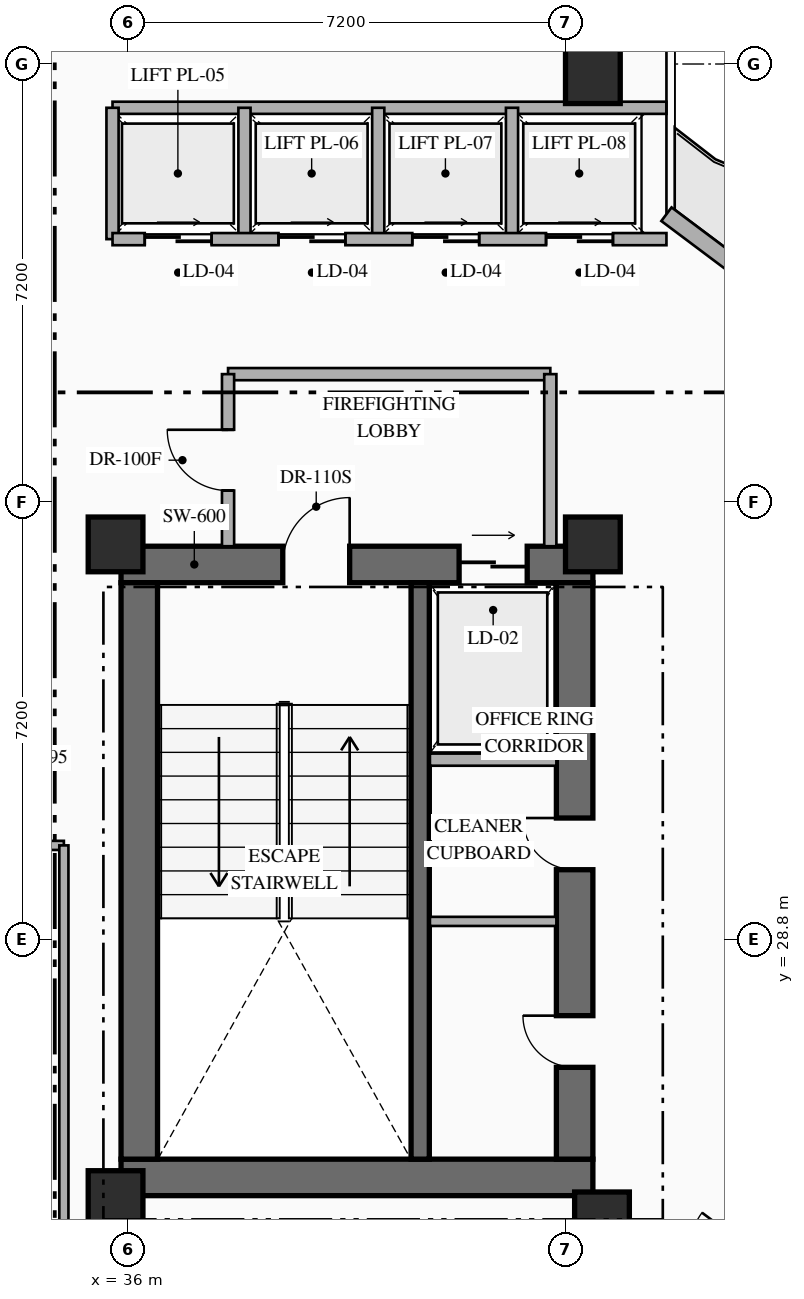
"""IFC4 building model, lengths in metres.
Left out: names, types, materials, properties, quantities, classifications, styles, units other than length and angle.
Written with IfcOpenShell. Run it as: python <this file> out.ifc"""

import sys

from ifc_helpers import new_model, si_unit, direction, frame, frame_2d, origin, origin_2d, place, context, subcontext, project, spatial, rectangle, extrude, element, fill, save


model = new_model("IFC4")
c1 = context("Model", 3, precision=1e-05, world=origin(), true_north=direction((0.0, 1.0)))
c2 = subcontext(c1, "Body", "Model", "MODEL_VIEW")
j1 = project(units=[si_unit("LENGTHUNIT", "METRE"), si_unit("PLANEANGLEUNIT", "RADIAN")], contexts=[c1])
p1 = place(None, origin())
s1 = spatial("IfcSite", under=j1, at=p1, CompositionType="ELEMENT")
p2 = place(p1, origin())
s2 = spatial("IfcBuilding", under=s1, at=p2, CompositionType="ELEMENT")
p3 = place(p2, frame((0.0, 0.0, 119.25)))
s3 = spatial("IfcBuildingStorey", under=s2, at=p3, CompositionType="ELEMENT", Elevation=119.25)
p4 = place(p3, frame((35.89, 24.89, 0.0), z_axis=(0.0, 0.0, 1.0), x_axis=(1.0, 0.0, 0.0)))
e1 = element("IfcWall", 1, at=p4, inside=s3, PredefinedType="SHEAR", context=c2, shape_type="SweptSolid", body=[
    extrude(rectangle(XDim=7.76, YDim=0.6, at=frame_2d((3.88, 0.0))), origin(), (0.0, 0.0, 1.0), 3.6),
])
p5 = place(p3, frame((35.89, 34.97, 0.0), z_axis=(0.0, 0.0, 1.0), x_axis=(1.0, 0.0, 0.0)))
e2 = element("IfcWall", 2, at=p5, inside=s3, PredefinedType="SHEAR", context=c2, shape_type="SweptSolid", body=[
    extrude(rectangle(XDim=7.76, YDim=0.6, at=frame_2d((3.88, 0.0))), origin(), (0.0, 0.0, 1.0), 3.6),
])
p6 = place(p5, frame((2.66, 0.0, 0.0)))
e3 = element("IfcOpeningElement", 3, at=p6, cuts=e2, PredefinedType="OPENING", context=c2, shape_type="SweptSolid", body=[
    extrude(rectangle(XDim=1.1, YDim=2.2, at=frame_2d((0.55, 1.1))), frame((0.0, 0.31, 0.0), z_axis=(0.0, -1.0, 0.0), x_axis=(1.0, 0.0, 0.0)), (0.0, 0.0, 1.0), 0.62),
])
p7 = place(p5, frame((5.56, 0.0, 0.0)))
e4 = element("IfcOpeningElement", 4, at=p7, cuts=e2, PredefinedType="OPENING", context=c2, shape_type="SweptSolid", body=[
    extrude(rectangle(XDim=1.12, YDim=2.15, at=frame_2d((0.56, 1.075))), frame((0.0, 0.31, 0.0), z_axis=(0.0, -1.0, 0.0), x_axis=(1.0, 0.0, 0.0)), (0.0, 0.0, 1.0), 0.62),
])
p8 = place(p3, frame((36.19, 25.19, 0.0), z_axis=(0.0, 0.0, 1.0), x_axis=(0.0, 1.0, 0.0)))
e5 = element("IfcWall", 5, at=p8, inside=s3, PredefinedType="SHEAR", context=c2, shape_type="SweptSolid", body=[
    extrude(rectangle(XDim=9.48, YDim=0.6, at=frame_2d((4.74, 0.0))), origin(), (0.0, 0.0, 1.0), 3.6),
])
p9 = place(p3, frame((43.35, 25.19, 0.0), z_axis=(0.0, 0.0, 1.0), x_axis=(0.0, 1.0, 0.0)))
e6 = element("IfcWall", 6, at=p9, inside=s3, PredefinedType="SHEAR", context=c2, shape_type="SweptSolid", body=[
    extrude(rectangle(XDim=9.48, YDim=0.6, at=frame_2d((4.74, 0.0))), origin(), (0.0, 0.0, 1.0), 3.6),
])
p10 = place(p9, frame((1.51, 0.0, 0.0)))
e7 = element("IfcOpeningElement", 7, at=p10, cuts=e6, PredefinedType="OPENING", context=c2, shape_type="SweptSolid", body=[
    extrude(rectangle(XDim=0.85, YDim=2.08, at=frame_2d((0.425, 1.04))), frame((0.0, 0.31, 0.0), z_axis=(0.0, -1.0, 0.0), x_axis=(1.0, 0.0, 0.0)), (0.0, 0.0, 1.0), 0.62),
])
p11 = place(p9, frame((4.76, 0.0, 0.0)))
e8 = element("IfcOpeningElement", 8, at=p11, cuts=e6, PredefinedType="OPENING", context=c2, shape_type="SweptSolid", body=[
    extrude(rectangle(XDim=0.85, YDim=2.08, at=frame_2d((0.425, 1.04))), frame((0.0, 0.31, 0.0), z_axis=(0.0, -1.0, 0.0), x_axis=(1.0, 0.0, 0.0)), (0.0, 0.0, 1.0), 0.62),
])
p12 = place(p3, frame((40.81, 25.19, 0.0), z_axis=(0.0, 0.0, 1.0), x_axis=(0.0, 1.0, 0.0)))
e9 = element("IfcWall", 9, at=p12, inside=s3, PredefinedType="SHEAR", context=c2, shape_type="SweptSolid", body=[
    extrude(rectangle(XDim=9.48, YDim=0.3, at=frame_2d((4.74, 0.0))), origin(), (0.0, 0.0, 1.0), 3.6),
])
for number, where, z_axis, x_axis in (
    (10, (35.8, 24.55, 0.0), (0.0, 0.0, 1.0), (1.0, 0.0, 0.0)),
    (11, (43.8, 24.2, 0.0), (0.0, 0.0, 1.0), (1.0, 0.0, 0.0)),
    (12, (35.8, 35.3, 0.0), (0.0, 0.0, 1.0), (1.0, 0.0, 0.0)),
    (13, (43.65, 35.3, 0.0), (0.0, 0.0, 1.0), (1.0, 0.0, 0.0)),
    (14, (43.65, 43.0, 0.0), (0.0, 0.0, 1.0), (1.0, 0.0, 0.0)),
):
    element("IfcColumn", number, at=place(p3, frame(where, z_axis=z_axis, x_axis=x_axis)), inside=s3, PredefinedType="COLUMN", context=c2, shape_type="SweptSolid", body=[
        extrude(rectangle(XDim=0.9, YDim=0.9, at=origin_2d()), origin(), (0.0, 0.0, 1.0), 3.6),
    ])
p13 = place(p3, frame((44.86, 40.73, 0.0), z_axis=(0.0, 0.0, 1.0), x_axis=(0.800006902154, -0.599990797017, 0.0)))
e15 = element("IfcWall", 15, at=p13, inside=s3, PredefinedType="STANDARD", context=c2, shape_type="SweptSolid", body=[
    extrude(rectangle(XDim=29.712, YDim=0.28, at=frame_2d((14.856, 0.0))), origin(), (0.0, 0.0, 1.0), 3.35),
])
p14 = place(p13, frame((14.249, 0.0, 0.0)))
e16 = element("IfcOpeningElement", 16, at=p14, cuts=e15, PredefinedType="OPENING", context=c2, shape_type="SweptSolid", body=[
    extrude(rectangle(XDim=1.1, YDim=2.2, at=frame_2d((0.55, 1.1))), frame((0.0, 0.15, 0.0), z_axis=(0.0, -1.0, 0.0), x_axis=(1.0, 0.0, 0.0)), (0.0, 0.0, 1.0), 0.3),
])
p15 = place(p13, frame((6.528, 0.0, 0.85)))
e17 = element("IfcOpeningElement", 17, at=p15, cuts=e15, PredefinedType="OPENING", context=c2, shape_type="SweptSolid", body=[
    extrude(rectangle(XDim=1.8, YDim=2.1, at=frame_2d((0.9, 1.05))), frame((0.0, 0.15, 0.0), z_axis=(0.0, -1.0, 0.0), x_axis=(1.0, 0.0, 0.0)), (0.0, 0.0, 1.0), 0.3),
])
p16 = place(p13, frame((21.384, 0.0, 0.85)))
e18 = element("IfcOpeningElement", 18, at=p16, cuts=e15, PredefinedType="OPENING", context=c2, shape_type="SweptSolid", body=[
    extrude(rectangle(XDim=1.8, YDim=2.1, at=frame_2d((0.9, 1.05))), frame((0.0, 0.15, 0.0), z_axis=(0.0, -1.0, 0.0), x_axis=(1.0, 0.0, 0.0)), (0.0, 0.0, 1.0), 0.3),
])
p17 = place(p3, frame((40.97, 31.76, 0.0), z_axis=(0.0, 0.0, 1.0), x_axis=(1.0, 0.0, 0.0)))
e19 = element("IfcWall", 19, at=p17, inside=s3, PredefinedType="STANDARD", context=c2, shape_type="SweptSolid", body=[
    extrude(rectangle(XDim=2.08, YDim=0.2, at=frame_2d((1.04, 0.0))), origin(), (0.0, 0.0, 1.0), 3.35),
])
p18 = place(p3, frame((40.97, 29.1, 0.0), z_axis=(0.0, 0.0, 1.0), x_axis=(1.0, 0.0, 0.0)))
e20 = element("IfcWall", 20, at=p18, inside=s3, PredefinedType="PARTITIONING", context=c2, shape_type="SweptSolid", body=[
    extrude(rectangle(XDim=2.08, YDim=0.15, at=frame_2d((1.04, 0.0))), origin(), (0.0, 0.0, 1.0), 3.35),
])
p19 = place(p3, frame((37.65, 38.1, 0.0), z_axis=(0.0, 0.0, 1.0), x_axis=(1.0, 0.0, 0.0)))
e21 = element("IfcWall", 21, at=p19, inside=s3, PredefinedType="STANDARD", context=c2, shape_type="SweptSolid", body=[
    extrude(rectangle(XDim=5.3, YDim=0.2, at=frame_2d((2.65, 0.0))), origin(), (0.0, 0.0, 1.0), 3.35),
])
p20 = place(p3, frame((42.95, 35.27, 0.0), z_axis=(0.0, 0.0, 1.0), x_axis=(0.0, 1.0, 0.0)))
e22 = element("IfcWall", 22, at=p20, inside=s3, PredefinedType="STANDARD", context=c2, shape_type="SweptSolid", body=[
    extrude(rectangle(XDim=2.83, YDim=0.2, at=frame_2d((1.415, 0.0))), origin(), (0.0, 0.0, 1.0), 3.35),
])
p21 = place(p3, frame((37.65, 35.27, 0.0), z_axis=(0.0, 0.0, 1.0), x_axis=(0.0, 1.0, 0.0)))
e23 = element("IfcWall", 23, at=p21, inside=s3, PredefinedType="STANDARD", context=c2, shape_type="SweptSolid", body=[
    extrude(rectangle(XDim=2.83, YDim=0.2, at=frame_2d((1.415, 0.0))), origin(), (0.0, 0.0, 1.0), 3.35),
])
p22 = place(p21, frame((0.915, 0.0, 0.0)))
e24 = element("IfcOpeningElement", 24, at=p22, cuts=e23, PredefinedType="OPENING", context=c2, shape_type="SweptSolid", body=[
    extrude(rectangle(XDim=1.0, YDim=2.2, at=frame_2d((0.5, 1.1))), frame((0.0, 0.11, 0.0), z_axis=(0.0, -1.0, 0.0), x_axis=(1.0, 0.0, 0.0)), (0.0, 0.0, 1.0), 0.22),
])
p23 = place(p3, frame((35.75, 42.48, 0.0), z_axis=(0.0, 0.0, 1.0), x_axis=(1.0, 0.0, 0.0)))
e25 = element("IfcWall", 25, at=p23, inside=s3, PredefinedType="STANDARD", context=c2, shape_type="SweptSolid", body=[
    extrude(rectangle(XDim=9.11, YDim=0.2, at=frame_2d((4.555, 0.0))), origin(), (0.0, 0.0, 1.0), 3.35),
])
for number, where, z_axis, x_axis in (
    (26, (35.75, 40.32, 0.0), (0.0, 0.0, 1.0), (0.0, 1.0, 0.0)),
    (27, (37.92, 40.32, 0.0), (0.0, 0.0, 1.0), (0.0, 1.0, 0.0)),
    (28, (40.12, 40.32, 0.0), (0.0, 0.0, 1.0), (0.0, 1.0, 0.0)),
    (29, (42.32, 40.32, 0.0), (0.0, 0.0, 1.0), (0.0, 1.0, 0.0)),
):
    element("IfcWall", number, at=place(p3, frame(where, z_axis=z_axis, x_axis=x_axis)), inside=s3, PredefinedType="STANDARD", context=c2, shape_type="SweptSolid", body=[
        extrude(rectangle(XDim=2.16, YDim=0.2, at=frame_2d((1.08, 0.0))), origin(), (0.0, 0.0, 1.0), 3.35),
    ])
p24 = place(p3, frame((35.75, 40.32, 0.0), z_axis=(0.0, 0.0, 1.0), x_axis=(1.0, 0.0, 0.0)))
e30 = element("IfcWall", 30, at=p24, inside=s3, PredefinedType="STANDARD", context=c2, shape_type="SweptSolid", body=[
    extrude(rectangle(XDim=9.11, YDim=0.2, at=frame_2d((4.555, 0.0))), origin(), (0.0, 0.0, 1.0), 3.35),
])
p25 = place(p24, frame((0.53, 0.0, 0.0)))
e31 = element("IfcOpeningElement", 31, at=p25, cuts=e30, PredefinedType="OPENING", context=c2, shape_type="SweptSolid", body=[
    extrude(rectangle(XDim=1.1, YDim=2.18, at=frame_2d((0.55, 1.09))), frame((0.0, 0.11, 0.0), z_axis=(0.0, -1.0, 0.0), x_axis=(1.0, 0.0, 0.0)), (0.0, 0.0, 1.0), 0.22),
])
p26 = place(p24, frame((2.73, 0.0, 0.0)))
e32 = element("IfcOpeningElement", 32, at=p26, cuts=e30, PredefinedType="OPENING", context=c2, shape_type="SweptSolid", body=[
    extrude(rectangle(XDim=1.1, YDim=2.18, at=frame_2d((0.55, 1.09))), frame((0.0, 0.11, 0.0), z_axis=(0.0, -1.0, 0.0), x_axis=(1.0, 0.0, 0.0)), (0.0, 0.0, 1.0), 0.22),
])
p27 = place(p24, frame((4.93, 0.0, 0.0)))
e33 = element("IfcOpeningElement", 33, at=p27, cuts=e30, PredefinedType="OPENING", context=c2, shape_type="SweptSolid", body=[
    extrude(rectangle(XDim=1.1, YDim=2.18, at=frame_2d((0.55, 1.09))), frame((0.0, 0.11, 0.0), z_axis=(0.0, -1.0, 0.0), x_axis=(1.0, 0.0, 0.0)), (0.0, 0.0, 1.0), 0.22),
])
p28 = place(p24, frame((7.13, 0.0, 0.0)))
e34 = element("IfcOpeningElement", 34, at=p28, cuts=e30, PredefinedType="OPENING", context=c2, shape_type="SweptSolid", body=[
    extrude(rectangle(XDim=1.1, YDim=2.18, at=frame_2d((0.55, 1.09))), frame((0.0, 0.11, 0.0), z_axis=(0.0, -1.0, 0.0), x_axis=(1.0, 0.0, 0.0)), (0.0, 0.0, 1.0), 0.22),
])
p29 = place(p3, frame((30.5, 30.35, 0.0), z_axis=(0.0, 0.0, 1.0), x_axis=(1.0, 0.0, 0.0)))
e35 = element("IfcWall", 35, at=p29, inside=s3, PredefinedType="PARTITIONING", context=c2, shape_type="SweptSolid", body=[
    extrude(rectangle(XDim=4.45, YDim=0.15, at=frame_2d((2.225, 0.0))), origin(), (0.0, 0.0, 1.0), 3.35),
])
p30 = place(p29, frame((2.846, 0.0, 0.0)))
e36 = element("IfcOpeningElement", 36, at=p30, cuts=e35, PredefinedType="OPENING", context=c2, shape_type="SweptSolid", body=[
    extrude(rectangle(XDim=0.95, YDim=2.15, at=frame_2d((0.475, 1.075))), frame((0.0, 0.085, 0.0), z_axis=(0.0, -1.0, 0.0), x_axis=(1.0, 0.0, 0.0)), (0.0, 0.0, 1.0), 0.17),
])
p31 = place(p3, frame((34.95, 23.2, 0.0), z_axis=(0.0, 0.0, 1.0), x_axis=(0.0, 1.0, 0.0)))
e37 = element("IfcWall", 37, at=p31, inside=s3, PredefinedType="PARTITIONING", context=c2, shape_type="SweptSolid", body=[
    extrude(rectangle(XDim=7.15, YDim=0.15, at=frame_2d((3.575, 0.0))), origin(), (0.0, 0.0, 1.0), 3.35),
])
p32 = place(p3, frame((43.04, 19.52, 0.0), z_axis=(0.0, 0.0, 1.0), x_axis=(0.600004069023, 0.799996948216, 0.0)))
e38 = element("IfcWall", 38, at=p32, inside=s3, PredefinedType="PARTITIONING", context=c2, shape_type="SweptSolid", body=[
    extrude(rectangle(XDim=9.6, YDim=0.15, at=frame_2d((4.8, 0.0))), origin(), (0.0, 0.0, 1.0), 3.35),
])
p33 = place(p32, frame((4.325, 0.0, 0.0)))
e39 = element("IfcOpeningElement", 39, at=p33, cuts=e38, PredefinedType="OPENING", context=c2, shape_type="SweptSolid", body=[
    extrude(rectangle(XDim=0.95, YDim=2.15, at=frame_2d((0.475, 1.075))), frame((0.0, 0.085, 0.0), z_axis=(0.0, -1.0, 0.0), x_axis=(1.0, 0.0, 0.0)), (0.0, 0.0, 1.0), 0.17),
])
p34 = place(p6, origin())
e40 = element("IfcDoor", 40, at=p34, inside=s3, OperationType="SINGLE_SWING_RIGHT", PredefinedType="DOOR", context=c2, shape_type="SweptSolid", body=[
    extrude(rectangle(XDim=1.1, YDim=2.2, at=frame_2d((0.55, 1.1))), frame((0.0, 0.025, 0.0), z_axis=(0.0, -1.0, 0.0), x_axis=(1.0, 0.0, 0.0)), (0.0, 0.0, 1.0), 0.05),
])
fill(e3, e40)
p35 = place(p7, origin())
e41 = element("IfcDoor", 41, at=p35, inside=s3, OperationType="SLIDING_TO_RIGHT", PredefinedType="USERDEFINED", context=c2, shape_type="SweptSolid", body=[
    extrude(rectangle(XDim=1.12, YDim=2.15, at=frame_2d((0.56, 1.075))), frame((0.0, 0.025, 0.0), z_axis=(0.0, -1.0, 0.0), x_axis=(1.0, 0.0, 0.0)), (0.0, 0.0, 1.0), 0.05),
])
fill(e4, e41)
p36 = place(p10, origin())
e42 = element("IfcDoor", 42, at=p36, inside=s3, OperationType="SINGLE_SWING_RIGHT", PredefinedType="DOOR", context=c2, shape_type="SweptSolid", body=[
    extrude(rectangle(XDim=0.85, YDim=2.08, at=frame_2d((0.425, 1.04))), frame((0.0, 0.025, 0.0), z_axis=(0.0, -1.0, 0.0), x_axis=(1.0, 0.0, 0.0)), (0.0, 0.0, 1.0), 0.05),
])
fill(e7, e42)
p37 = place(p11, origin())
e43 = element("IfcDoor", 43, at=p37, inside=s3, OperationType="SINGLE_SWING_RIGHT", PredefinedType="DOOR", context=c2, shape_type="SweptSolid", body=[
    extrude(rectangle(XDim=0.85, YDim=2.08, at=frame_2d((0.425, 1.04))), frame((0.0, 0.025, 0.0), z_axis=(0.0, -1.0, 0.0), x_axis=(1.0, 0.0, 0.0)), (0.0, 0.0, 1.0), 0.05),
])
fill(e8, e43)
p38 = place(p22, origin())
e44 = element("IfcDoor", 44, at=p38, inside=s3, OperationType="SINGLE_SWING_RIGHT", PredefinedType="DOOR", context=c2, shape_type="SweptSolid", body=[
    extrude(rectangle(XDim=1.0, YDim=2.2, at=frame_2d((0.5, 1.1))), frame((0.0, 0.025, 0.0), z_axis=(0.0, -1.0, 0.0), x_axis=(1.0, 0.0, 0.0)), (0.0, 0.0, 1.0), 0.05),
])
fill(e24, e44)
p39 = place(p25, origin())
e45 = element("IfcDoor", 45, at=p39, inside=s3, OperationType="SLIDING_TO_RIGHT", PredefinedType="USERDEFINED", context=c2, shape_type="SweptSolid", body=[
    extrude(rectangle(XDim=1.1, YDim=2.18, at=frame_2d((0.55, 1.09))), frame((0.0, 0.025, 0.0), z_axis=(0.0, -1.0, 0.0), x_axis=(1.0, 0.0, 0.0)), (0.0, 0.0, 1.0), 0.05),
])
fill(e31, e45)
p40 = place(p26, origin())
e46 = element("IfcDoor", 46, at=p40, inside=s3, OperationType="SLIDING_TO_RIGHT", PredefinedType="USERDEFINED", context=c2, shape_type="SweptSolid", body=[
    extrude(rectangle(XDim=1.1, YDim=2.18, at=frame_2d((0.55, 1.09))), frame((0.0, 0.025, 0.0), z_axis=(0.0, -1.0, 0.0), x_axis=(1.0, 0.0, 0.0)), (0.0, 0.0, 1.0), 0.05),
])
fill(e32, e46)
p41 = place(p27, origin())
e47 = element("IfcDoor", 47, at=p41, inside=s3, OperationType="SLIDING_TO_RIGHT", PredefinedType="USERDEFINED", context=c2, shape_type="SweptSolid", body=[
    extrude(rectangle(XDim=1.1, YDim=2.18, at=frame_2d((0.55, 1.09))), frame((0.0, 0.025, 0.0), z_axis=(0.0, -1.0, 0.0), x_axis=(1.0, 0.0, 0.0)), (0.0, 0.0, 1.0), 0.05),
])
fill(e33, e47)
p42 = place(p28, origin())
e48 = element("IfcDoor", 48, at=p42, inside=s3, OperationType="SLIDING_TO_RIGHT", PredefinedType="USERDEFINED", context=c2, shape_type="SweptSolid", body=[
    extrude(rectangle(XDim=1.1, YDim=2.18, at=frame_2d((0.55, 1.09))), frame((0.0, 0.025, 0.0), z_axis=(0.0, -1.0, 0.0), x_axis=(1.0, 0.0, 0.0)), (0.0, 0.0, 1.0), 0.05),
])
fill(e34, e48)
save(model, sys.argv[1])
